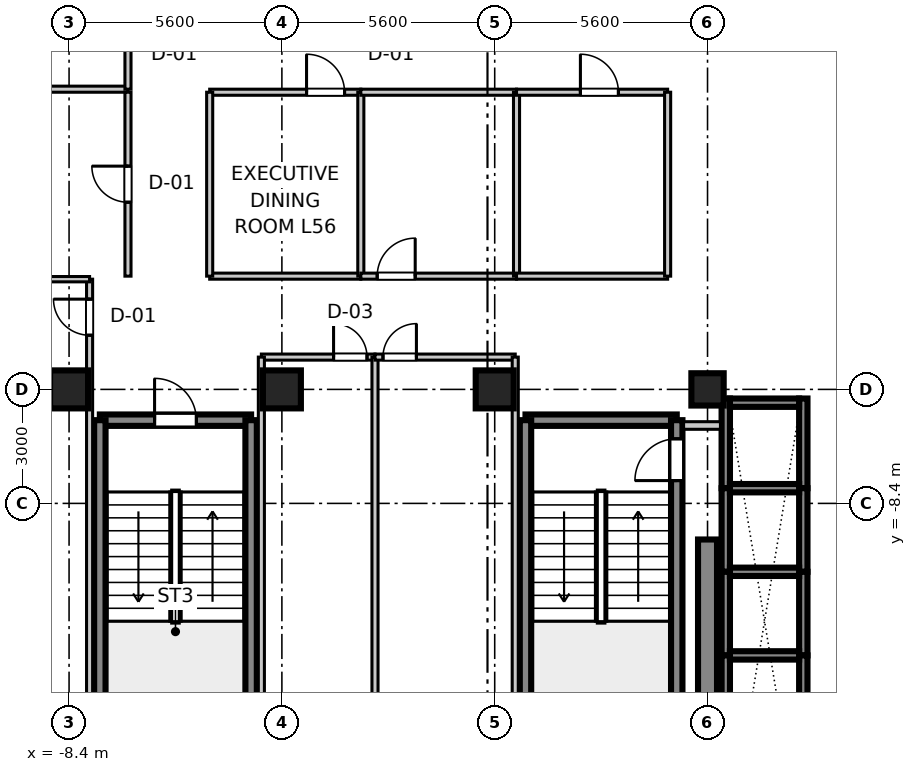
"""IFC4 building model, lengths in metres.
Left out: names, types, materials, properties, quantities, classifications, styles, units other than length and angle.
Written with IfcOpenShell. Run it as: python <this file> out.ifc"""

import sys

from ifc_helpers import new_model, si_unit, direction, frame, frame_2d, origin, origin_2d, place, context, subcontext, project, spatial, rectangle, extrude, source, transform, mapped, element, fill, save


model = new_model("IFC4")
c1 = context("Model", 3, precision=1e-05, world=origin(), true_north=direction((0.0, 1.0)))
c2 = subcontext(c1, "Body", "Model", "MODEL_VIEW")
j1 = project(units=[si_unit("LENGTHUNIT", "METRE"), si_unit("PLANEANGLEUNIT", "RADIAN")], contexts=[c1])
p1 = place(None, origin())
s1 = spatial("IfcSite", under=j1, at=p1, CompositionType="ELEMENT")
p2 = place(p1, origin())
s2 = spatial("IfcBuilding", under=s1, at=p2, CompositionType="ELEMENT")
p3 = place(p2, frame((0.0, 0.0, 219.7)))
s3 = spatial("IfcBuildingStorey", under=s2, at=p3, CompositionType="ELEMENT", Elevation=219.7)
m1 = source(origin(), c2, "Body", "SweptSolid", [
    extrude(rectangle(XDim=1.0, YDim=1.0, at=origin_2d()), origin(), (0.0, 0.0, 1.0), 3.655),
])
for number, where, z_axis, x_axis in (
    (1, (-8.4, -5.4, 0.0), (0.0, 0.0, 1.0), (1.0, 0.0, 0.0)),
    (2, (-2.8, -5.4, 0.0), (0.0, 0.0, 1.0), (1.0, 0.0, 0.0)),
    (3, (2.8, -5.4, 0.0), (0.0, 0.0, 1.0), (1.0, 0.0, 0.0)),
):
    element("IfcColumn", number, at=place(p3, frame(where, z_axis=z_axis, x_axis=x_axis)), inside=s3, PredefinedType="COLUMN", context=c2, shape_type="MappedRepresentation", body=[
        mapped(m1, transform((0.0, 0.0, 0.0), scale=1.0)),
    ])
m2 = source(origin(), c2, "Body", "SweptSolid", [
    extrude(rectangle(XDim=0.85, YDim=0.85, at=origin_2d()), origin(), (0.0, 0.0, 1.0), 3.655),
])
p4 = place(p3, frame((8.4, -5.4, 0.0), z_axis=(0.0, 0.0, 1.0), x_axis=(1.0, 0.0, 0.0)))
e4 = element("IfcColumn", 4, at=p4, inside=s3, PredefinedType="PILASTER", context=c2, shape_type="MappedRepresentation", body=[
    mapped(m2, transform((0.0, 0.0, 0.0), scale=1.0)),
])
m3 = source(origin(), c2, "Body", "SweptSolid", [
    extrude(rectangle(XDim=7.65, YDim=0.5, at=frame_2d((3.825, 0.0))), origin(), (0.0, 0.0, 1.0), 3.41),
])
p5 = place(p3, frame((8.4, -17.0, 0.0), z_axis=(0.0, 0.0, 1.0), x_axis=(0.0, 1.0, 0.0)))
e5 = element("IfcWall", 5, at=p5, inside=s3, PredefinedType="SHEAR", context=c2, shape_type="MappedRepresentation", body=[
    mapped(m3, transform((0.0, 0.0, 0.0), scale=1.0)),
])
m4 = source(origin(), c2, "Body", "SweptSolid", [
    extrude(rectangle(XDim=3.98, YDim=0.3, at=frame_2d((1.99, 0.0))), origin(), (0.0, 0.0, 1.0), 3.41),
])
p6 = place(p3, frame((3.61, -6.21, 0.0), z_axis=(0.0, 0.0, 1.0), x_axis=(1.0, 0.0, 0.0)))
e6 = element("IfcWall", 6, at=p6, inside=s3, PredefinedType="SHEAR", context=c2, shape_type="MappedRepresentation", body=[
    mapped(m4, transform((0.0, 0.0, 0.0), scale=1.0)),
])
m5 = source(origin(), c2, "Body", "SweptSolid", [
    extrude(rectangle(XDim=9.38, YDim=0.3, at=frame_2d((4.69, 0.0))), origin(), (0.0, 0.0, 1.0), 3.41),
])
p7 = place(p3, frame((3.61, -15.59, 0.0), z_axis=(0.0, 0.0, 1.0), x_axis=(0.0, 1.0, 0.0)))
e7 = element("IfcWall", 7, at=p7, inside=s3, PredefinedType="SHEAR", context=c2, shape_type="MappedRepresentation", body=[
    mapped(m5, transform((0.0, 0.0, 0.0), scale=1.0)),
])
p8 = place(p3, frame((7.59, -15.59, 0.0), z_axis=(0.0, 0.0, 1.0), x_axis=(0.0, 1.0, 0.0)))
e8 = element("IfcWall", 8, at=p8, inside=s3, PredefinedType="SHEAR", context=c2, shape_type="MappedRepresentation", body=[
    mapped(m5, transform((0.0, 0.0, 0.0), scale=1.0)),
])
p9 = place(p8, frame((7.79, 0.0, 0.0)))
e9 = element("IfcOpeningElement", 9, at=p9, cuts=e8, PredefinedType="OPENING", context=c2, shape_type="SweptSolid", body=[
    extrude(rectangle(XDim=1.1, YDim=2.15, at=frame_2d((0.55, 1.075))), frame((0.0, 0.16, 0.0), z_axis=(0.0, -1.0, 0.0), x_axis=(1.0, 0.0, 0.0)), (0.0, 0.0, 1.0), 0.32),
])
p10 = place(p3, frame((-7.59, -6.21, 0.0), z_axis=(0.0, 0.0, 1.0), x_axis=(1.0, 0.0, 0.0)))
e10 = element("IfcWall", 10, at=p10, inside=s3, PredefinedType="SHEAR", context=c2, shape_type="MappedRepresentation", body=[
    mapped(m4, transform((0.0, 0.0, 0.0), scale=1.0)),
])
p11 = place(p10, frame((1.44, 0.0, 0.0)))
e11 = element("IfcOpeningElement", 11, at=p11, cuts=e10, PredefinedType="OPENING", context=c2, shape_type="SweptSolid", body=[
    extrude(rectangle(XDim=1.1, YDim=2.15, at=frame_2d((0.55, 1.075))), frame((0.0, 0.16, 0.0), z_axis=(0.0, -1.0, 0.0), x_axis=(1.0, 0.0, 0.0)), (0.0, 0.0, 1.0), 0.32),
])
for number, where, z_axis, x_axis in (
    (12, (-7.59, -15.59, 0.0), (0.0, 0.0, 1.0), (0.0, 1.0, 0.0)),
    (13, (-3.61, -15.59, 0.0), (0.0, 0.0, 1.0), (0.0, 1.0, 0.0)),
):
    element("IfcWall", number, at=place(p3, frame(where, z_axis=z_axis, x_axis=x_axis)), inside=s3, PredefinedType="SHEAR", context=c2, shape_type="MappedRepresentation", body=[
        mapped(m5, transform((0.0, 0.0, 0.0), scale=1.0)),
    ])
m6 = source(origin(), c2, "Body", "SweptSolid", [
    extrude(rectangle(XDim=2.36, YDim=0.22, at=frame_2d((1.18, 0.0))), origin(), (0.0, 0.0, 1.0), 3.41),
])
for number, where, z_axis, x_axis in (
    (14, (8.88, -8.0, 0.0), (0.0, 0.0, 1.0), (0.0, 1.0, 0.0)),
    (15, (10.92, -8.0, 0.0), (0.0, 0.0, 1.0), (0.0, 1.0, 0.0)),
):
    element("IfcWall", number, at=place(p3, frame(where, z_axis=z_axis, x_axis=x_axis)), inside=s3, PredefinedType="SHEAR", context=c2, shape_type="MappedRepresentation", body=[
        mapped(m6, transform((0.0, 0.0, 0.0), scale=1.0)),
    ])
m7 = source(origin(), c2, "Body", "SweptSolid", [
    extrude(rectangle(XDim=1.82, YDim=0.22, at=frame_2d((0.91, 0.0))), origin(), (0.0, 0.0, 1.0), 3.41),
])
p12 = place(p3, frame((8.99, -5.75, 0.0), z_axis=(0.0, 0.0, 1.0), x_axis=(1.0, 0.0, 0.0)))
e16 = element("IfcWall", 16, at=p12, inside=s3, PredefinedType="SHEAR", context=c2, shape_type="MappedRepresentation", body=[
    mapped(m7, transform((0.0, 0.0, 0.0), scale=1.0)),
])
m8 = source(origin(), c2, "Body", "SweptSolid", [
    extrude(rectangle(XDim=2.2, YDim=0.22, at=frame_2d((1.1, 0.0))), origin(), (0.0, 0.0, 1.0), 3.41),
])
for number, where, z_axis, x_axis in (
    (17, (8.88, -10.2, 0.0), (0.0, 0.0, 1.0), (0.0, 1.0, 0.0)),
    (18, (10.92, -10.2, 0.0), (0.0, 0.0, 1.0), (0.0, 1.0, 0.0)),
):
    element("IfcWall", number, at=place(p3, frame(where, z_axis=z_axis, x_axis=x_axis)), inside=s3, PredefinedType="SHEAR", context=c2, shape_type="MappedRepresentation", body=[
        mapped(m8, transform((0.0, 0.0, 0.0), scale=1.0)),
    ])
m9 = source(origin(), c2, "Body", "SweptSolid", [
    extrude(rectangle(XDim=1.82, YDim=0.22, at=frame_2d((0.91, 0.0))), origin(), (0.0, 0.0, 1.0), 3.7),
])
p13 = place(p3, frame((8.99, -8.0, 0.0), z_axis=(0.0, 0.0, 1.0), x_axis=(1.0, 0.0, 0.0)))
e19 = element("IfcWall", 19, at=p13, inside=s3, PredefinedType="SHEAR", context=c2, shape_type="MappedRepresentation", body=[
    mapped(m9, transform((0.0, 0.0, 0.0), scale=1.0)),
])
for number, where, z_axis, x_axis in (
    (20, (8.88, -12.4, 0.0), (0.0, 0.0, 1.0), (0.0, 1.0, 0.0)),
    (21, (10.92, -12.4, 0.0), (0.0, 0.0, 1.0), (0.0, 1.0, 0.0)),
):
    element("IfcWall", number, at=place(p3, frame(where, z_axis=z_axis, x_axis=x_axis)), inside=s3, PredefinedType="SHEAR", context=c2, shape_type="MappedRepresentation", body=[
        mapped(m8, transform((0.0, 0.0, 0.0), scale=1.0)),
    ])
p14 = place(p3, frame((8.99, -10.2, 0.0), z_axis=(0.0, 0.0, 1.0), x_axis=(1.0, 0.0, 0.0)))
e22 = element("IfcWall", 22, at=p14, inside=s3, PredefinedType="SHEAR", context=c2, shape_type="MappedRepresentation", body=[
    mapped(m9, transform((0.0, 0.0, 0.0), scale=1.0)),
])
m10 = source(origin(), c2, "Body", "SweptSolid", [
    extrude(rectangle(XDim=2.325, YDim=0.22, at=frame_2d((1.163, 0.0))), origin(), (0.0, 0.0, 1.0), 3.41),
])
for number, where, z_axis, x_axis in (
    (23, (8.88, -14.725, 0.0), (0.0, 0.0, 1.0), (0.0, 1.0, 0.0)),
    (24, (10.92, -14.725, 0.0), (0.0, 0.0, 1.0), (0.0, 1.0, 0.0)),
):
    element("IfcWall", number, at=place(p3, frame(where, z_axis=z_axis, x_axis=x_axis)), inside=s3, PredefinedType="SHEAR", context=c2, shape_type="MappedRepresentation", body=[
        mapped(m10, transform((0.0, 0.0, 0.0), scale=1.0)),
    ])
p15 = place(p3, frame((8.99, -12.4, 0.0), z_axis=(0.0, 0.0, 1.0), x_axis=(1.0, 0.0, 0.0)))
e25 = element("IfcWall", 25, at=p15, inside=s3, PredefinedType="SHEAR", context=c2, shape_type="MappedRepresentation", body=[
    mapped(m9, transform((0.0, 0.0, 0.0), scale=1.0)),
])
m11 = source(origin(), c2, "Body", "SweptSolid", [
    extrude(rectangle(XDim=0.97, YDim=0.2, at=frame_2d((0.485, 0.0))), origin(), (0.0, 0.0, 1.0), 2.75),
])
p16 = place(p3, frame((7.77, -6.35, 0.0), z_axis=(0.0, 0.0, 1.0), x_axis=(1.0, 0.0, 0.0)))
e26 = element("IfcWall", 26, at=p16, inside=s3, PredefinedType="PARTITIONING", context=c2, shape_type="MappedRepresentation", body=[
    mapped(m11, transform((0.0, 0.0, 0.0), scale=1.0)),
])
m12 = source(origin(), c2, "Body", "SweptSolid", [
    extrude(rectangle(XDim=14.31, YDim=0.16, at=frame_2d((7.155, 0.0))), origin(), (0.0, 0.0, 1.0), 2.75),
])
p17 = place(p3, frame((-21.16, 2.5, 0.0), z_axis=(0.0, 0.0, 1.0), x_axis=(1.0, 0.0, 0.0)))
e27 = element("IfcWall", 27, at=p17, inside=s3, PredefinedType="PARTITIONING", context=c2, shape_type="MappedRepresentation", body=[
    mapped(m12, transform((0.0, 0.0, 0.0), scale=1.0)),
])
m13 = source(origin(), c2, "Body", "SweptSolid", [
    extrude(rectangle(XDim=10.7, YDim=0.16, at=frame_2d((5.35, 0.0))), origin(), (0.0, 0.0, 1.0), 2.75),
])
p18 = place(p3, frame((-6.85, 2.5, 0.0), z_axis=(0.0, 0.0, 1.0), x_axis=(0.0, 1.0, 0.0)))
e28 = element("IfcWall", 28, at=p18, inside=s3, PredefinedType="PARTITIONING", context=c2, shape_type="MappedRepresentation", body=[
    mapped(m13, transform((0.0, 0.0, 0.0), scale=1.0)),
])
p19 = place(p18, frame((4.91, 0.0, 0.0)))
e29 = element("IfcOpeningElement", 29, at=p19, cuts=e28, PredefinedType="OPENING", context=c2, shape_type="SweptSolid", body=[
    extrude(rectangle(XDim=0.88, YDim=2.1, at=frame_2d((0.44, 1.05))), frame((0.0, 0.09, 0.0), z_axis=(0.0, -1.0, 0.0), x_axis=(1.0, 0.0, 0.0)), (0.0, 0.0, 1.0), 0.18),
])
m14 = source(origin(), c2, "Body", "SweptSolid", [
    extrude(rectangle(XDim=21.4, YDim=0.16, at=frame_2d((10.7, 0.0))), origin(), (0.0, 0.0, 1.0), 2.75),
])
p20 = place(p3, frame((-7.86, -23.9, 0.0), z_axis=(0.0, 0.0, 1.0), x_axis=(0.0, 1.0, 0.0)))
e30 = element("IfcWall", 30, at=p20, inside=s3, PredefinedType="PARTITIONING", context=c2, shape_type="MappedRepresentation", body=[
    mapped(m14, transform((0.0, 0.0, 0.0), scale=1.0)),
])
p21 = place(p20, frame((19.925, 0.0, 0.0)))
e31 = element("IfcOpeningElement", 31, at=p21, cuts=e30, PredefinedType="OPENING", context=c2, shape_type="SweptSolid", body=[
    extrude(rectangle(XDim=0.95, YDim=2.1, at=frame_2d((0.475, 1.05))), frame((0.0, 0.09, 0.0), z_axis=(0.0, -1.0, 0.0), x_axis=(1.0, 0.0, 0.0)), (0.0, 0.0, 1.0), 0.18),
])
m15 = source(origin(), c2, "Body", "SweptSolid", [
    extrude(rectangle(XDim=13.3, YDim=0.14, at=frame_2d((6.65, 0.0))), origin(), (0.0, 0.0, 1.0), 2.75),
])
p22 = place(p3, frame((-21.16, -2.5, 0.0), z_axis=(0.0, 0.0, 1.0), x_axis=(1.0, 0.0, 0.0)))
e32 = element("IfcWall", 32, at=p22, inside=s3, PredefinedType="PARTITIONING", context=c2, shape_type="MappedRepresentation", body=[
    mapped(m15, transform((0.0, 0.0, 0.0), scale=1.0)),
])
m16 = source(origin(), c2, "Body", "SweptSolid", [
    extrude(rectangle(XDim=2.99, YDim=0.16, at=frame_2d((1.495, 0.0))), origin(), (0.0, 0.0, 1.0), 2.75),
])
p23 = place(p3, frame((-3.34, -4.55, 0.0), z_axis=(0.0, 0.0, 1.0), x_axis=(1.0, 0.0, 0.0)))
e33 = element("IfcWall", 33, at=p23, inside=s3, PredefinedType="PARTITIONING", context=c2, shape_type="MappedRepresentation", body=[
    mapped(m16, transform((0.0, 0.0, 0.0), scale=1.0)),
])
p24 = place(p23, frame((1.9, 0.0, 0.0)))
e34 = element("IfcOpeningElement", 34, at=p24, cuts=e33, PredefinedType="OPENING", context=c2, shape_type="SweptSolid", body=[
    extrude(rectangle(XDim=0.88, YDim=2.1, at=frame_2d((0.44, 1.05))), frame((0.0, 0.09, 0.0), z_axis=(0.0, -1.0, 0.0), x_axis=(1.0, 0.0, 0.0)), (0.0, 0.0, 1.0), 0.18),
])
m17 = source(origin(), c2, "Body", "SweptSolid", [
    extrude(rectangle(XDim=19.35, YDim=0.16, at=frame_2d((9.675, 0.0))), origin(), (0.0, 0.0, 1.0), 2.75),
])
for number, where, z_axis, x_axis in (
    (35, (-3.34, -23.9, 0.0), (0.0, 0.0, 1.0), (0.0, 1.0, 0.0)),
    (36, (-0.35, -23.9, 0.0), (0.0, 0.0, 1.0), (0.0, 1.0, 0.0)),
):
    element("IfcWall", number, at=place(p3, frame(where, z_axis=z_axis, x_axis=x_axis)), inside=s3, PredefinedType="PARTITIONING", context=c2, shape_type="MappedRepresentation", body=[
        mapped(m17, transform((0.0, 0.0, 0.0), scale=1.0)),
    ])
m18 = source(origin(), c2, "Body", "SweptSolid", [
    extrude(rectangle(XDim=3.69, YDim=0.16, at=frame_2d((1.845, 0.0))), origin(), (0.0, 0.0, 1.0), 2.75),
])
p25 = place(p3, frame((-0.35, -4.55, 0.0), z_axis=(0.0, 0.0, 1.0), x_axis=(1.0, 0.0, 0.0)))
e37 = element("IfcWall", 37, at=p25, inside=s3, PredefinedType="PARTITIONING", context=c2, shape_type="MappedRepresentation", body=[
    mapped(m18, transform((0.0, 0.0, 0.0), scale=1.0)),
])
p26 = place(p25, frame((0.21, 0.0, 0.0)))
e38 = element("IfcOpeningElement", 38, at=p26, cuts=e37, PredefinedType="OPENING", context=c2, shape_type="SweptSolid", body=[
    extrude(rectangle(XDim=0.88, YDim=2.1, at=frame_2d((0.44, 1.05))), frame((0.0, 0.09, 0.0), z_axis=(0.0, -1.0, 0.0), x_axis=(1.0, 0.0, 0.0)), (0.0, 0.0, 1.0), 0.18),
])
p27 = place(p3, frame((3.34, -23.9, 0.0), z_axis=(0.0, 0.0, 1.0), x_axis=(0.0, 1.0, 0.0)))
e39 = element("IfcWall", 39, at=p27, inside=s3, PredefinedType="PARTITIONING", context=c2, shape_type="MappedRepresentation", body=[
    mapped(m17, transform((0.0, 0.0, 0.0), scale=1.0)),
])
m19 = source(origin(), c2, "Body", "SweptSolid", [
    extrude(rectangle(XDim=4.84, YDim=0.16, at=frame_2d((2.42, 0.0))), origin(), (0.0, 0.0, 1.0), 2.75),
])
p28 = place(p3, frame((-6.85, -2.42, 0.0), z_axis=(0.0, 0.0, 1.0), x_axis=(0.0, 1.0, 0.0)))
e40 = element("IfcWall", 40, at=p28, inside=s3, PredefinedType="PARTITIONING", context=c2, shape_type="MappedRepresentation", body=[
    mapped(m19, transform((0.0, 0.0, 0.0), scale=1.0)),
])
p29 = place(p28, frame((1.945, 0.0, 0.0)))
e41 = element("IfcOpeningElement", 41, at=p29, cuts=e40, PredefinedType="OPENING", context=c2, shape_type="SweptSolid", body=[
    extrude(rectangle(XDim=0.95, YDim=2.1, at=frame_2d((0.475, 1.05))), frame((0.0, 0.09, 0.0), z_axis=(0.0, -1.0, 0.0), x_axis=(1.0, 0.0, 0.0)), (0.0, 0.0, 1.0), 0.18),
])
m20 = source(origin(), c2, "Body", "SweptSolid", [
    extrude(rectangle(XDim=3.977, YDim=0.16, at=frame_2d((1.989, 0.0))), origin(), (0.0, 0.0, 1.0), 2.75),
])
p30 = place(p3, frame((-4.7, -2.42, 0.0), z_axis=(0.0, 0.0, 1.0), x_axis=(1.0, 0.0, 0.0)))
e42 = element("IfcWall", 42, at=p30, inside=s3, PredefinedType="PARTITIONING", context=c2, shape_type="MappedRepresentation", body=[
    mapped(m20, transform((0.0, 0.0, 0.0), scale=1.0)),
])
p31 = place(p3, frame((-4.7, 2.42, 0.0), z_axis=(0.0, 0.0, 1.0), x_axis=(1.0, 0.0, 0.0)))
e43 = element("IfcWall", 43, at=p31, inside=s3, PredefinedType="PARTITIONING", context=c2, shape_type="MappedRepresentation", body=[
    mapped(m20, transform((0.0, 0.0, 0.0), scale=1.0)),
])
p32 = place(p31, frame((2.549, 0.0, 0.0)))
e44 = element("IfcOpeningElement", 44, at=p32, cuts=e43, PredefinedType="OPENING", context=c2, shape_type="SweptSolid", body=[
    extrude(rectangle(XDim=1.0, YDim=2.1, at=frame_2d((0.5, 1.05))), frame((0.0, 0.09, 0.0), z_axis=(0.0, -1.0, 0.0), x_axis=(1.0, 0.0, 0.0)), (0.0, 0.0, 1.0), 0.18),
])
for number, where, z_axis, x_axis in (
    (45, (-4.7, -2.42, 0.0), (0.0, 0.0, 1.0), (0.0, 1.0, 0.0)),
    (46, (-0.723, -2.42, 0.0), (0.0, 0.0, 1.0), (0.0, 1.0, 0.0)),
):
    element("IfcWall", number, at=place(p3, frame(where, z_axis=z_axis, x_axis=x_axis)), inside=s3, PredefinedType="PARTITIONING", context=c2, shape_type="MappedRepresentation", body=[
        mapped(m19, transform((0.0, 0.0, 0.0), scale=1.0)),
    ])
m21 = source(origin(), c2, "Body", "SweptSolid", [
    extrude(rectangle(XDim=4.097, YDim=0.16, at=frame_2d((2.048, 0.0))), origin(), (0.0, 0.0, 1.0), 2.75),
])
p33 = place(p3, frame((-0.723, -2.42, 0.0), z_axis=(0.0, 0.0, 1.0), x_axis=(1.0, 0.0, 0.0)))
e47 = element("IfcWall", 47, at=p33, inside=s3, PredefinedType="PARTITIONING", context=c2, shape_type="MappedRepresentation", body=[
    mapped(m21, transform((0.0, 0.0, 0.0), scale=1.0)),
])
p34 = place(p33, frame((0.431, 0.0, 0.0)))
e48 = element("IfcOpeningElement", 48, at=p34, cuts=e47, PredefinedType="OPENING", context=c2, shape_type="SweptSolid", body=[
    extrude(rectangle(XDim=1.0, YDim=2.1, at=frame_2d((0.5, 1.05))), frame((0.0, 0.09, 0.0), z_axis=(0.0, -1.0, 0.0), x_axis=(1.0, 0.0, 0.0)), (0.0, 0.0, 1.0), 0.18),
])
p35 = place(p3, frame((-0.723, 2.42, 0.0), z_axis=(0.0, 0.0, 1.0), x_axis=(1.0, 0.0, 0.0)))
e49 = element("IfcWall", 49, at=p35, inside=s3, PredefinedType="PARTITIONING", context=c2, shape_type="MappedRepresentation", body=[
    mapped(m21, transform((0.0, 0.0, 0.0), scale=1.0)),
])
p36 = place(p3, frame((3.374, -2.42, 0.0), z_axis=(0.0, 0.0, 1.0), x_axis=(0.0, 1.0, 0.0)))
e50 = element("IfcWall", 50, at=p36, inside=s3, PredefinedType="PARTITIONING", context=c2, shape_type="MappedRepresentation", body=[
    mapped(m19, transform((0.0, 0.0, 0.0), scale=1.0)),
])
m22 = source(origin(), c2, "Body", "SweptSolid", [
    extrude(rectangle(XDim=3.976, YDim=0.16, at=frame_2d((1.988, 0.0))), origin(), (0.0, 0.0, 1.0), 2.75),
])
p37 = place(p3, frame((3.374, -2.42, 0.0), z_axis=(0.0, 0.0, 1.0), x_axis=(1.0, 0.0, 0.0)))
e51 = element("IfcWall", 51, at=p37, inside=s3, PredefinedType="PARTITIONING", context=c2, shape_type="MappedRepresentation", body=[
    mapped(m22, transform((0.0, 0.0, 0.0), scale=1.0)),
])
p38 = place(p3, frame((3.374, 2.42, 0.0), z_axis=(0.0, 0.0, 1.0), x_axis=(1.0, 0.0, 0.0)))
e52 = element("IfcWall", 52, at=p38, inside=s3, PredefinedType="PARTITIONING", context=c2, shape_type="MappedRepresentation", body=[
    mapped(m22, transform((0.0, 0.0, 0.0), scale=1.0)),
])
p39 = place(p38, frame((1.681, 0.0, 0.0)))
e53 = element("IfcOpeningElement", 53, at=p39, cuts=e52, PredefinedType="OPENING", context=c2, shape_type="SweptSolid", body=[
    extrude(rectangle(XDim=1.0, YDim=2.1, at=frame_2d((0.5, 1.05))), frame((0.0, 0.09, 0.0), z_axis=(0.0, -1.0, 0.0), x_axis=(1.0, 0.0, 0.0)), (0.0, 0.0, 1.0), 0.18),
])
p40 = place(p3, frame((7.35, -2.42, 0.0), z_axis=(0.0, 0.0, 1.0), x_axis=(0.0, 1.0, 0.0)))
e54 = element("IfcWall", 54, at=p40, inside=s3, PredefinedType="PARTITIONING", context=c2, shape_type="MappedRepresentation", body=[
    mapped(m19, transform((0.0, 0.0, 0.0), scale=1.0)),
])
m23 = source(origin(), c2, "Body", "SweptSolid", [
    extrude(rectangle(XDim=1.1, YDim=2.15, at=frame_2d((0.55, 1.075))), frame((0.0, 0.025, 0.0), z_axis=(0.0, -1.0, 0.0), x_axis=(1.0, 0.0, 0.0)), (0.0, 0.0, 1.0), 0.05),
])
p41 = place(p9, origin())
e55 = element("IfcDoor", 55, at=p41, inside=s3, OperationType="SINGLE_SWING_LEFT", PredefinedType="DOOR", context=c2, shape_type="MappedRepresentation", body=[
    mapped(m23, transform((0.0, 0.0, 0.0), scale=1.0)),
])
fill(e9, e55)
p42 = place(p11, frame((1.1, 0.0, 0.0), z_axis=(0.0, 0.0, 1.0), x_axis=(-1.0, 0.0, 0.0)))
e56 = element("IfcDoor", 56, at=p42, inside=s3, OperationType="SINGLE_SWING_LEFT", PredefinedType="DOOR", context=c2, shape_type="MappedRepresentation", body=[
    mapped(m23, transform((0.0, 0.0, 0.0), scale=1.0)),
])
fill(e11, e56)
m24 = source(origin(), c2, "Body", "SweptSolid", [
    extrude(rectangle(XDim=0.95, YDim=2.1, at=frame_2d((0.475, 1.05))), frame((0.0, 0.025, 0.0), z_axis=(0.0, -1.0, 0.0), x_axis=(1.0, 0.0, 0.0)), (0.0, 0.0, 1.0), 0.05),
])
p43 = place(p21, origin())
e57 = element("IfcDoor", 57, at=p43, inside=s3, OperationType="SINGLE_SWING_RIGHT", PredefinedType="DOOR", context=c2, shape_type="MappedRepresentation", body=[
    mapped(m24, transform((0.0, 0.0, 0.0), scale=1.0)),
])
fill(e31, e57)
m25 = source(origin(), c2, "Body", "SweptSolid", [
    extrude(rectangle(XDim=0.88, YDim=2.1, at=frame_2d((0.44, 1.05))), frame((0.0, 0.025, 0.0), z_axis=(0.0, -1.0, 0.0), x_axis=(1.0, 0.0, 0.0)), (0.0, 0.0, 1.0), 0.05),
])
p44 = place(p24, frame((0.88, 0.0, 0.0), z_axis=(0.0, 0.0, 1.0), x_axis=(-1.0, 0.0, 0.0)))
e58 = element("IfcDoor", 58, at=p44, inside=s3, OperationType="SINGLE_SWING_LEFT", PredefinedType="DOOR", context=c2, shape_type="MappedRepresentation", body=[
    mapped(m25, transform((0.0, 0.0, 0.0), scale=1.0)),
])
fill(e34, e58)
p45 = place(p26, frame((0.88, 0.0, 0.0), z_axis=(0.0, 0.0, 1.0), x_axis=(-1.0, 0.0, 0.0)))
e59 = element("IfcDoor", 59, at=p45, inside=s3, OperationType="SINGLE_SWING_RIGHT", PredefinedType="DOOR", context=c2, shape_type="MappedRepresentation", body=[
    mapped(m25, transform((0.0, 0.0, 0.0), scale=1.0)),
])
fill(e38, e59)
p46 = place(p29, origin())
e60 = element("IfcDoor", 60, at=p46, inside=s3, OperationType="SINGLE_SWING_RIGHT", PredefinedType="DOOR", context=c2, shape_type="MappedRepresentation", body=[
    mapped(m24, transform((0.0, 0.0, 0.0), scale=1.0)),
])
fill(e41, e60)
m26 = source(origin(), c2, "Body", "SweptSolid", [
    extrude(rectangle(XDim=1.0, YDim=2.1, at=frame_2d((0.5, 1.05))), frame((0.0, 0.025, 0.0), z_axis=(0.0, -1.0, 0.0), x_axis=(1.0, 0.0, 0.0)), (0.0, 0.0, 1.0), 0.05),
])
p47 = place(p32, frame((1.0, 0.0, 0.0), z_axis=(0.0, 0.0, 1.0), x_axis=(-1.0, 0.0, 0.0)))
e61 = element("IfcDoor", 61, at=p47, inside=s3, OperationType="SINGLE_SWING_LEFT", PredefinedType="DOOR", context=c2, shape_type="MappedRepresentation", body=[
    mapped(m26, transform((0.0, 0.0, 0.0), scale=1.0)),
])
fill(e44, e61)
p48 = place(p34, origin())
e62 = element("IfcDoor", 62, at=p48, inside=s3, OperationType="SINGLE_SWING_RIGHT", PredefinedType="DOOR", context=c2, shape_type="MappedRepresentation", body=[
    mapped(m26, transform((0.0, 0.0, 0.0), scale=1.0)),
])
fill(e48, e62)
p49 = place(p39, frame((1.0, 0.0, 0.0), z_axis=(0.0, 0.0, 1.0), x_axis=(-1.0, 0.0, 0.0)))
e63 = element("IfcDoor", 63, at=p49, inside=s3, OperationType="SINGLE_SWING_LEFT", PredefinedType="DOOR", context=c2, shape_type="MappedRepresentation", body=[
    mapped(m26, transform((0.0, 0.0, 0.0), scale=1.0)),
])
fill(e53, e63)
save(model, sys.argv[1])
